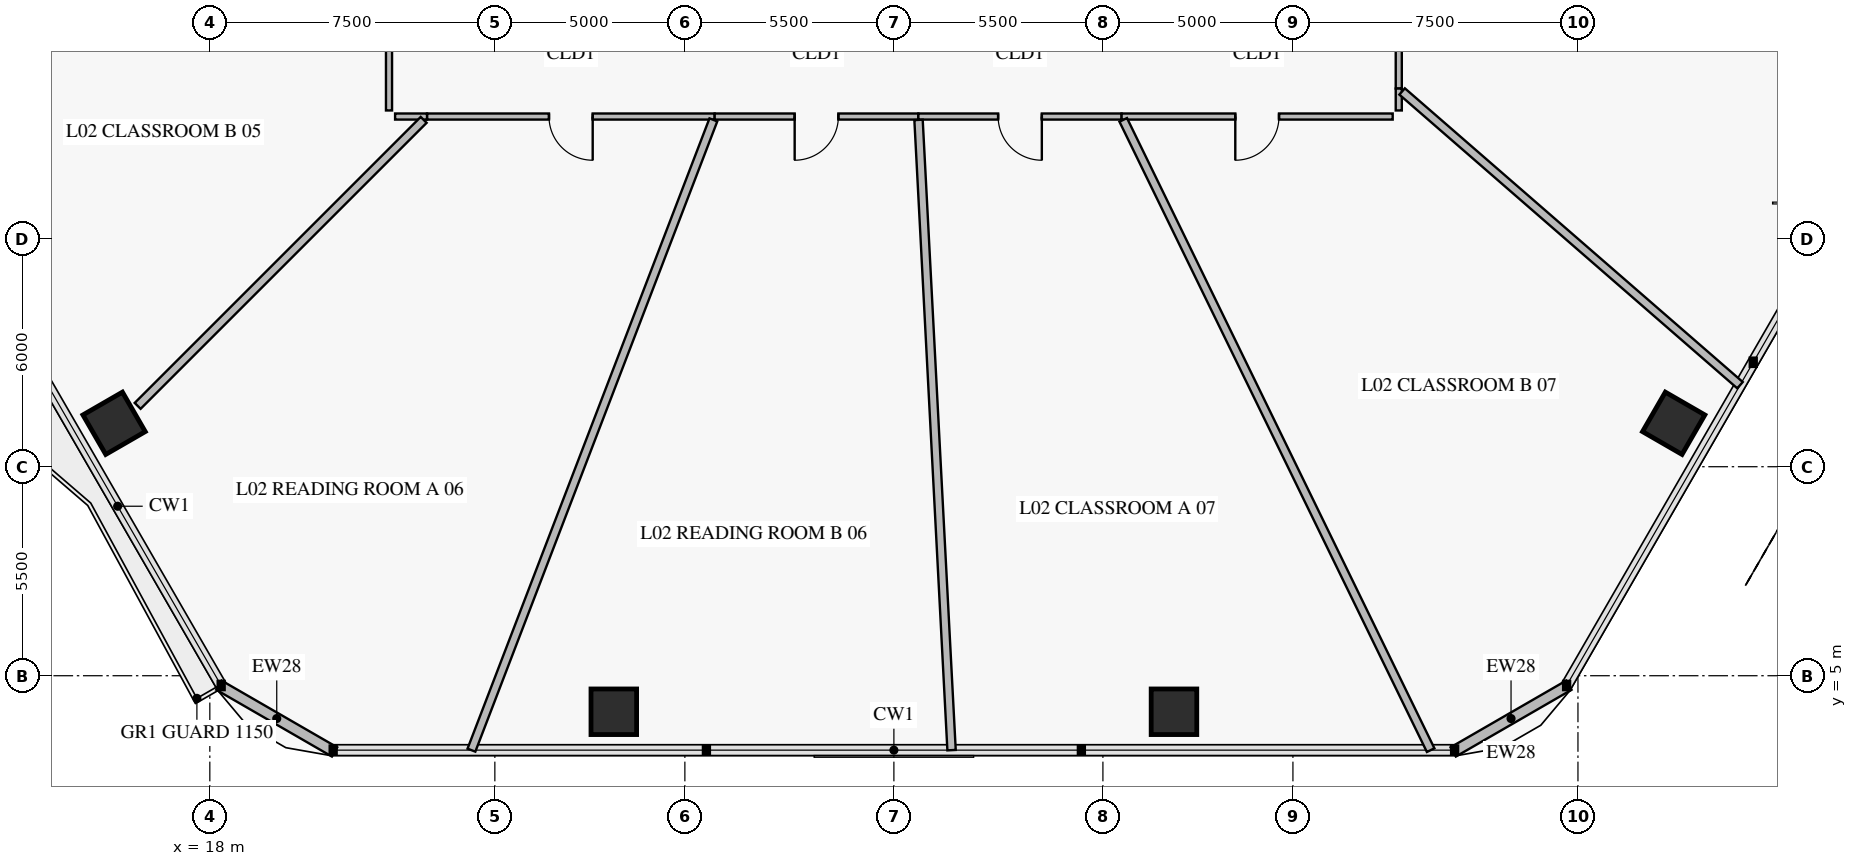
"""IFC4 building model, lengths in metres.
Left out: names, types, materials, properties, quantities, classifications, styles, units other than length and angle.
Written with IfcOpenShell. Run it as: python <this file> out.ifc"""

import sys

from ifc_helpers import new_model, si_unit, direction, frame, frame_2d, origin, origin_2d, place, context, subcontext, project, spatial, rectangle, extrude, element, fill, save


model = new_model("IFC4")
c1 = context("Model", 3, precision=1e-05, world=origin(), true_north=direction((0.0, 1.0)))
c2 = subcontext(c1, "Body", "Model", "MODEL_VIEW")
j1 = project(units=[si_unit("LENGTHUNIT", "METRE"), si_unit("PLANEANGLEUNIT", "RADIAN")], contexts=[c1])
p1 = place(None, origin())
s1 = spatial("IfcSite", under=j1, at=p1, CompositionType="ELEMENT")
p2 = place(p1, origin())
s2 = spatial("IfcBuilding", under=s1, at=p2, CompositionType="ELEMENT")
p3 = place(p2, frame((0.0, 0.0, 7.8)))
s3 = spatial("IfcBuildingStorey", under=s2, at=p3, CompositionType="ELEMENT", Elevation=7.8)
for number, where, z_axis, x_axis in (
    (1, (15.481, 11.643, 0.0), (0.0, 0.0, 1.0), (0.5, -0.866, 0.0)),
    (2, (28.63, 4.052, 0.0), (0.0, 0.0, 1.0), (1.0, 0.0, 0.0)),
    (3, (43.37, 4.052, 0.0), (0.0, 0.0, 1.0), (1.0, 0.0, 0.0)),
    (4, (56.519, 11.643, 0.0), (0.0, 0.0, 1.0), (0.5, 0.866, 0.0)),
):
    element("IfcColumn", number, at=place(p3, frame(where, z_axis=z_axis, x_axis=x_axis)), inside=s3, PredefinedType="COLUMN", context=c2, shape_type="SweptSolid", body=[
        extrude(rectangle(XDim=1.2, YDim=1.2, at=origin_2d()), origin(), (0.0, 0.0, 1.0), 3.92),
    ])
for number, where, z_axis, x_axis in (
    (5, (53.761, 4.751, 0.0), (0.0, 0.0, 1.0), (-0.866, -0.5, 0.0)),
    (6, (21.283, 2.994, 0.0), (0.0, 0.0, 1.0), (-0.866, 0.5, 0.0)),
):
    element("IfcWall", number, at=place(p3, frame(where, z_axis=z_axis, x_axis=x_axis)), inside=s3, PredefinedType="SOLIDWALL", context=c2, shape_type="SweptSolid", body=[
        extrude(rectangle(XDim=3.515, YDim=0.28, at=frame_2d((1.757, 0.0))), origin(), (0.0, 0.0, 1.0), 3.92),
    ])
p4 = place(p3, frame((22.715, 26.633, 0.0), z_axis=(0.0, 0.0, 1.0), x_axis=(0.0, -1.0, 0.0)))
e7 = element("IfcWall", 7, at=p4, inside=s3, PredefinedType="PARTITIONING", context=c2, shape_type="SweptSolid", body=[
    extrude(rectangle(XDim=6.758, YDim=0.16, at=frame_2d((3.379, 0.0))), origin(), (0.0, 0.0, 1.0), 3.92),
])
p5 = place(p4, frame((2.804, 0.0, 0.0)))
e8 = element("IfcOpeningElement", 8, at=p5, cuts=e7, PredefinedType="OPENING", context=c2, shape_type="SweptSolid", body=[
    extrude(rectangle(XDim=1.15, YDim=2.2, at=frame_2d((0.575, 1.1))), frame((0.0, 0.092, 0.0), z_axis=(0.0, -1.0, 0.0), x_axis=(1.0, 0.0, 0.0)), (0.0, 0.0, 1.0), 0.184),
])
p6 = place(p3, frame((23.715, 19.715, 0.0), z_axis=(0.0, 0.0, 1.0), x_axis=(1.0, 0.0, 0.0)))
e9 = element("IfcWall", 9, at=p6, inside=s3, PredefinedType="PARTITIONING", context=c2, shape_type="SweptSolid", body=[
    extrude(rectangle(XDim=7.569, YDim=0.16, at=frame_2d((3.785, 0.0))), origin(), (0.0, 0.0, 1.0), 3.22),
])
p7 = place(p6, frame((3.21, 0.0, 0.0)))
e10 = element("IfcOpeningElement", 10, at=p7, cuts=e9, PredefinedType="OPENING", context=c2, shape_type="SweptSolid", body=[
    extrude(rectangle(XDim=1.15, YDim=2.2, at=frame_2d((0.575, 1.1))), frame((0.0, 0.092, 0.0), z_axis=(0.0, -1.0, 0.0), x_axis=(1.0, 0.0, 0.0)), (0.0, 0.0, 1.0), 0.184),
])
p8 = place(p3, frame((31.284, 19.715, 0.0), z_axis=(0.0, 0.0, 1.0), x_axis=(1.0, 0.0, 0.0)))
e11 = element("IfcWall", 11, at=p8, inside=s3, PredefinedType="PARTITIONING", context=c2, shape_type="SweptSolid", body=[
    extrude(rectangle(XDim=5.36, YDim=0.16, at=frame_2d((2.68, 0.0))), origin(), (0.0, 0.0, 1.0), 3.22),
])
p9 = place(p8, frame((2.105, 0.0, 0.0)))
e12 = element("IfcOpeningElement", 12, at=p9, cuts=e11, PredefinedType="OPENING", context=c2, shape_type="SweptSolid", body=[
    extrude(rectangle(XDim=1.15, YDim=2.2, at=frame_2d((0.575, 1.1))), frame((0.0, 0.092, 0.0), z_axis=(0.0, -1.0, 0.0), x_axis=(1.0, 0.0, 0.0)), (0.0, 0.0, 1.0), 0.184),
])
p10 = place(p3, frame((36.644, 19.715, 0.0), z_axis=(0.0, 0.0, 1.0), x_axis=(1.0, 0.0, 0.0)))
e13 = element("IfcWall", 13, at=p10, inside=s3, PredefinedType="PARTITIONING", context=c2, shape_type="SweptSolid", body=[
    extrude(rectangle(XDim=5.348, YDim=0.16, at=frame_2d((2.674, 0.0))), origin(), (0.0, 0.0, 1.0), 3.22),
])
p11 = place(p10, frame((2.099, 0.0, 0.0)))
e14 = element("IfcOpeningElement", 14, at=p11, cuts=e13, PredefinedType="OPENING", context=c2, shape_type="SweptSolid", body=[
    extrude(rectangle(XDim=1.15, YDim=2.2, at=frame_2d((0.575, 1.1))), frame((0.0, 0.092, 0.0), z_axis=(0.0, -1.0, 0.0), x_axis=(1.0, 0.0, 0.0)), (0.0, 0.0, 1.0), 0.184),
])
p12 = place(p3, frame((41.992, 19.715, 0.0), z_axis=(0.0, 0.0, 1.0), x_axis=(1.0, 0.0, 0.0)))
e15 = element("IfcWall", 15, at=p12, inside=s3, PredefinedType="PARTITIONING", context=c2, shape_type="SweptSolid", body=[
    extrude(rectangle(XDim=7.133, YDim=0.16, at=frame_2d((3.567, 0.0))), origin(), (0.0, 0.0, 1.0), 3.22),
])
p13 = place(p12, frame((2.992, 0.0, 0.0)))
e16 = element("IfcOpeningElement", 16, at=p13, cuts=e15, PredefinedType="OPENING", context=c2, shape_type="SweptSolid", body=[
    extrude(rectangle(XDim=1.15, YDim=2.2, at=frame_2d((0.575, 1.1))), frame((0.0, 0.092, 0.0), z_axis=(0.0, -1.0, 0.0), x_axis=(1.0, 0.0, 0.0)), (0.0, 0.0, 1.0), 0.184),
])
p14 = place(p3, frame((49.285, 20.451, 0.0), z_axis=(0.0, 0.0, 1.0), x_axis=(0.0, 1.0, 0.0)))
e17 = element("IfcWall", 17, at=p14, inside=s3, PredefinedType="PARTITIONING", context=c2, shape_type="SweptSolid", body=[
    extrude(rectangle(XDim=12.711, YDim=0.16, at=frame_2d((6.355, 0.0))), origin(), (0.0, 0.0, 1.0), 3.22),
])
p15 = place(p14, frame((5.88, 0.0, 0.0)))
e18 = element("IfcOpeningElement", 18, at=p15, cuts=e17, PredefinedType="OPENING", context=c2, shape_type="SweptSolid", body=[
    extrude(rectangle(XDim=0.95, YDim=2.1, at=frame_2d((0.475, 1.05))), frame((0.0, 0.092, 0.0), z_axis=(0.0, -1.0, 0.0), x_axis=(1.0, 0.0, 0.0)), (0.0, 0.0, 1.0), 0.184),
])
p16 = place(p3, frame((22.627, 26.597, 0.0), z_axis=(0.0, 0.0, 1.0), x_axis=(-0.927186166431, -0.3746008713, 0.0)))
e19 = element("IfcWall", 19, at=p16, inside=s3, PredefinedType="PARTITIONING", context=c2, shape_type="SweptSolid", body=[
    extrude(rectangle(XDim=14.82, YDim=0.22, at=frame_2d((7.41, 0.0))), origin(), (0.0, 0.0, 1.0), 3.17),
])
p17 = place(p3, frame((22.875, 19.715, 0.0), z_axis=(0.0, 0.0, 1.0), x_axis=(1.0, 0.0, 0.0)))
e20 = element("IfcWall", 20, at=p17, inside=s3, PredefinedType="PARTITIONING", context=c2, shape_type="SweptSolid", body=[
    extrude(rectangle(XDim=0.84, YDim=0.16, at=frame_2d((0.42, 0.0))), origin(), (0.0, 0.0, 1.0), 3.22),
])
p18 = place(p3, frame((23.627, 19.627, 0.0), z_axis=(0.0, 0.0, 1.0), x_axis=(-0.707106781187, -0.707106781187, 0.0)))
e21 = element("IfcWall", 21, at=p18, inside=s3, PredefinedType="PARTITIONING", context=c2, shape_type="SweptSolid", body=[
    extrude(rectangle(XDim=10.643, YDim=0.22, at=frame_2d((5.322, 0.0))), origin(), (0.0, 0.0, 1.0), 3.22),
])
p19 = place(p3, frame((31.25, 19.627, 0.0), z_axis=(0.0, 0.0, 1.0), x_axis=(-0.358374904207, -0.933577756823, 0.0)))
e22 = element("IfcWall", 22, at=p19, inside=s3, PredefinedType="PARTITIONING", context=c2, shape_type="SweptSolid", body=[
    extrude(rectangle(XDim=17.765, YDim=0.22, at=frame_2d((8.883, 0.0))), origin(), (0.0, 0.0, 1.0), 3.17),
])
p20 = place(p3, frame((36.648, 19.627, 0.0), z_axis=(0.0, 0.0, 1.0), x_axis=(0.052331996973, -0.998629742243, 0.0)))
e23 = element("IfcWall", 23, at=p20, inside=s3, PredefinedType="PARTITIONING", context=c2, shape_type="SweptSolid", body=[
    extrude(rectangle(XDim=16.608, YDim=0.22, at=frame_2d((8.304, 0.0))), origin(), (0.0, 0.0, 1.0), 3.17),
])
p21 = place(p3, frame((42.035, 19.627, 0.0), z_axis=(0.0, 0.0, 1.0), x_axis=(0.438375147569, -0.898792094977, 0.0)))
e24 = element("IfcWall", 24, at=p21, inside=s3, PredefinedType="PARTITIONING", context=c2, shape_type="SweptSolid", body=[
    extrude(rectangle(XDim=18.453, YDim=0.22, at=frame_2d((9.227, 0.0))), origin(), (0.0, 0.0, 1.0), 3.17),
])
p22 = place(p3, frame((49.285, 19.875, 0.0), z_axis=(0.0, 0.0, 1.0), x_axis=(0.0, 1.0, 0.0)))
e25 = element("IfcWall", 25, at=p22, inside=s3, PredefinedType="PARTITIONING", context=c2, shape_type="SweptSolid", body=[
    extrude(rectangle(XDim=0.576, YDim=0.16, at=frame_2d((0.288, 0.0))), origin(), (0.0, 0.0, 1.0), 3.92),
])
p23 = place(p3, frame((49.373, 20.375, 0.0), z_axis=(0.0, 0.0, 1.0), x_axis=(0.754715261602, -0.656052493254, 0.0)))
e26 = element("IfcWall", 26, at=p23, inside=s3, PredefinedType="PARTITIONING", context=c2, shape_type="SweptSolid", body=[
    extrude(rectangle(XDim=11.781, YDim=0.22, at=frame_2d((5.891, 0.0))), origin(), (0.0, 0.0, 1.0), 3.17),
])
p24 = place(p7, frame((1.15, 0.0, 0.0), z_axis=(0.0, 0.0, 1.0), x_axis=(-1.0, 0.0, 0.0)))
e27 = element("IfcDoor", 27, at=p24, inside=s3, OperationType="SINGLE_SWING_LEFT", PredefinedType="DOOR", context=c2, shape_type="SweptSolid", body=[
    extrude(rectangle(XDim=1.15, YDim=2.2, at=frame_2d((0.575, 1.1))), frame((0.0, 0.025, 0.0), z_axis=(0.0, -1.0, 0.0), x_axis=(1.0, 0.0, 0.0)), (0.0, 0.0, 1.0), 0.05),
])
fill(e10, e27)
p25 = place(p9, frame((1.15, 0.0, 0.0), z_axis=(0.0, 0.0, 1.0), x_axis=(-1.0, 0.0, 0.0)))
e28 = element("IfcDoor", 28, at=p25, inside=s3, OperationType="SINGLE_SWING_RIGHT", PredefinedType="DOOR", context=c2, shape_type="SweptSolid", body=[
    extrude(rectangle(XDim=1.15, YDim=2.2, at=frame_2d((0.575, 1.1))), frame((0.0, 0.025, 0.0), z_axis=(0.0, -1.0, 0.0), x_axis=(1.0, 0.0, 0.0)), (0.0, 0.0, 1.0), 0.05),
])
fill(e12, e28)
p26 = place(p11, frame((1.15, 0.0, 0.0), z_axis=(0.0, 0.0, 1.0), x_axis=(-1.0, 0.0, 0.0)))
e29 = element("IfcDoor", 29, at=p26, inside=s3, OperationType="SINGLE_SWING_LEFT", PredefinedType="DOOR", context=c2, shape_type="SweptSolid", body=[
    extrude(rectangle(XDim=1.15, YDim=2.2, at=frame_2d((0.575, 1.1))), frame((0.0, 0.025, 0.0), z_axis=(0.0, -1.0, 0.0), x_axis=(1.0, 0.0, 0.0)), (0.0, 0.0, 1.0), 0.05),
])
fill(e14, e29)
p27 = place(p13, frame((1.15, 0.0, 0.0), z_axis=(0.0, 0.0, 1.0), x_axis=(-1.0, 0.0, 0.0)))
e30 = element("IfcDoor", 30, at=p27, inside=s3, OperationType="SINGLE_SWING_RIGHT", PredefinedType="DOOR", context=c2, shape_type="SweptSolid", body=[
    extrude(rectangle(XDim=1.15, YDim=2.2, at=frame_2d((0.575, 1.1))), frame((0.0, 0.025, 0.0), z_axis=(0.0, -1.0, 0.0), x_axis=(1.0, 0.0, 0.0)), (0.0, 0.0, 1.0), 0.05),
])
fill(e16, e30)
save(model, sys.argv[1])
